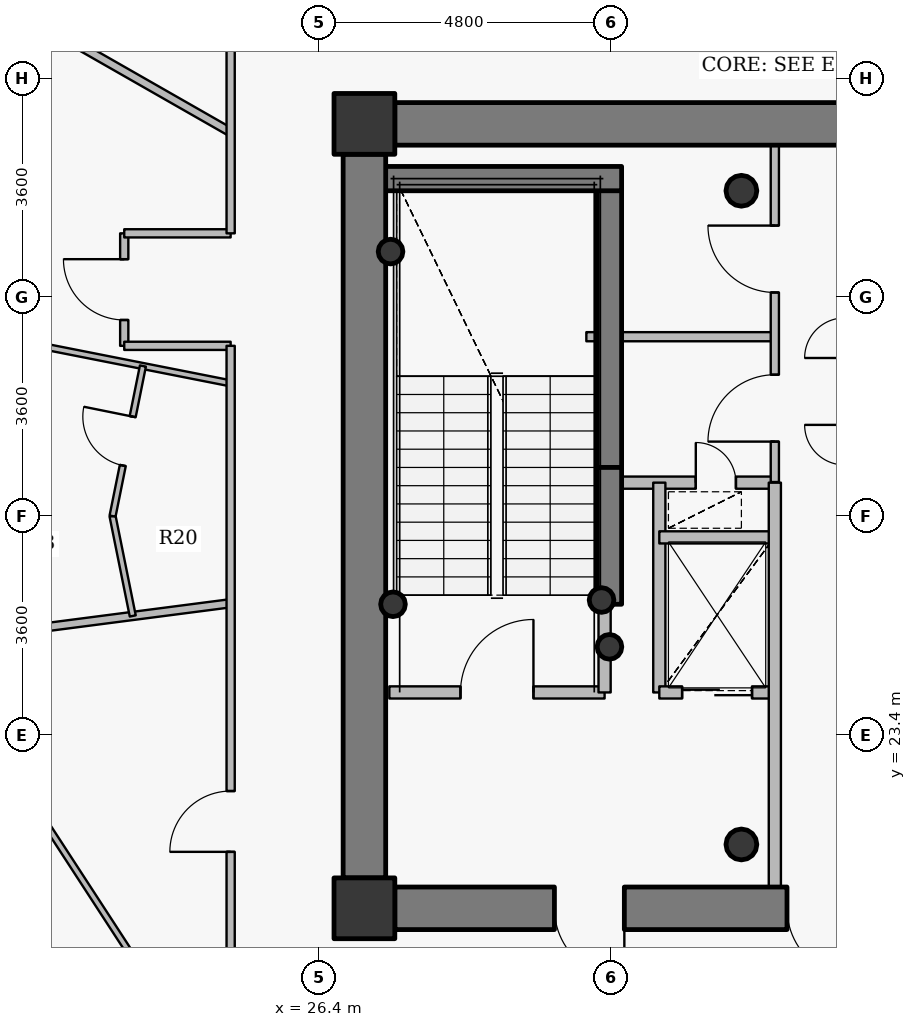
"""IFC4 building model, lengths in metres.
Left out: names, types, materials, properties, quantities, classifications, styles, units other than length and angle.
Written with IfcOpenShell. Run it as: python <this file> out.ifc"""

import sys

from ifc_helpers import new_model, si_unit, direction, frame, frame_2d, origin, origin_2d, place, context, subcontext, project, spatial, rectangle, hollow_circle, extrude, source, transform, mapped, element, fill, save


model = new_model("IFC4")
c1 = context("Model", 3, precision=1e-05, world=origin(), true_north=direction((0.0, 1.0)))
c2 = subcontext(c1, "Body", "Model", "MODEL_VIEW")
j1 = project(units=[si_unit("LENGTHUNIT", "METRE"), si_unit("PLANEANGLEUNIT", "RADIAN")], contexts=[c1])
p1 = place(None, origin())
s1 = spatial("IfcSite", under=j1, at=p1, CompositionType="ELEMENT")
p2 = place(p1, origin())
s2 = spatial("IfcBuilding", under=s1, at=p2, CompositionType="ELEMENT")
p3 = place(p2, frame((0.0, 0.0, 299.25)))
s3 = spatial("IfcBuildingStorey", under=s2, at=p3, CompositionType="ELEMENT", Elevation=299.25)
for number, where, z_axis, x_axis in (
    (1, (27.15, 20.55, 0.0), (0.0, 0.0, 1.0), (1.0, 0.0, 0.0)),
    (2, (27.15, 33.45, 0.0), (0.0, 0.0, 1.0), (1.0, 0.0, 0.0)),
):
    element("IfcColumn", number, at=place(p3, frame(where, z_axis=z_axis, x_axis=x_axis)), inside=s3, PredefinedType="COLUMN", context=c2, shape_type="SweptSolid", body=[
        extrude(rectangle(XDim=1.0, YDim=1.0, at=origin_2d()), origin(), (0.0, 0.0, 1.0), 3.75),
    ])
for number, where, z_axis, x_axis in (
    (3, (33.35, 21.6, 0.0), (0.0, 0.0, 1.0), (1.0, 0.0, 0.0)),
    (4, (33.35, 32.35, 0.0), (0.0, 0.0, 1.0), (1.0, 0.0, 0.0)),
):
    element("IfcColumn", number, at=place(p3, frame(where, z_axis=z_axis, x_axis=x_axis)), inside=s3, PredefinedType="COLUMN", context=c2, shape_type="SweptSolid", body=[
        extrude(hollow_circle(Radius=0.254, WallThickness=0.02, at=origin_2d()), origin(), (0.0, 0.0, 1.0), 3.75),
    ])
p4 = place(p3, frame((31.18, 27.8, 0.0), z_axis=(0.0, 0.0, 1.0), x_axis=(0.0, 1.0, 0.0)))
e5 = element("IfcWall", 5, at=p4, inside=s3, PredefinedType="SHEAR", context=c2, shape_type="SweptSolid", body=[
    extrude(rectangle(XDim=4.75, YDim=0.4, at=frame_2d((2.375, 0.0))), origin(), (0.0, 0.0, 1.0), 3.75),
])
p5 = place(p3, frame((27.25, 32.55, 0.0), z_axis=(0.0, 0.0, 1.0), x_axis=(1.0, 0.0, 0.0)))
e6 = element("IfcWall", 6, at=p5, inside=s3, PredefinedType="SHEAR", context=c2, shape_type="SweptSolid", body=[
    extrude(rectangle(XDim=4.13, YDim=0.4, at=frame_2d((2.065, 0.0))), origin(), (0.0, 0.0, 1.0), 3.75),
])
for number, where, z_axis, x_axis in (
    (7, (27.58, 31.35, 0.0), (0.0, 0.0, 1.0), (1.0, 0.0, 0.0)),
    (8, (31.05, 25.62, 0.0), (0.0, 0.0, 1.0), (1.0, 0.0, 0.0)),
    (9, (31.18, 24.85, 0.0), (0.0, 0.0, 1.0), (1.0, 0.0, 0.0)),
    (10, (27.62, 25.55, 0.0), (0.0, 0.0, 1.0), (1.0, 0.0, 0.0)),
):
    element("IfcColumn", number, at=place(p3, frame(where, z_axis=z_axis, x_axis=x_axis)), inside=s3, PredefinedType="COLUMN", context=c2, shape_type="SweptSolid", body=[
        extrude(hollow_circle(Radius=0.203, WallThickness=0.016, at=origin_2d()), origin(), (0.0, 0.0, 1.0), 3.75),
    ])
p6 = place(p3, frame((27.65, 33.45, 0.0), z_axis=(0.0, 0.0, 1.0), x_axis=(1.0, 0.0, 0.0)))
e11 = element("IfcWall", 11, at=p6, inside=s3, PredefinedType="SHEAR", context=c2, shape_type="SweptSolid", body=[
    extrude(rectangle(XDim=16.7, YDim=0.7, at=frame_2d((8.35, 0.0))), origin(), (0.0, 0.0, 1.0), 3.05),
])
p7 = place(p6, frame((12.775, 0.0, 0.0)))
e12 = element("IfcOpeningElement", 12, at=p7, cuts=e11, PredefinedType="OPENING", context=c2, shape_type="SweptSolid", body=[
    extrude(rectangle(XDim=1.15, YDim=2.15, at=origin_2d()), frame((0.575, 0.36, 1.075), z_axis=(0.0, -1.0, 0.0), x_axis=(1.0, 0.0, 0.0)), (0.0, 0.0, 1.0), 0.72),
])
p8 = place(p3, frame((44.35, 20.55, 0.0), z_axis=(0.0, 0.0, 1.0), x_axis=(-1.0, 0.0, 0.0)))
e13 = element("IfcWall", 13, at=p8, inside=s3, PredefinedType="SHEAR", context=c2, shape_type="SweptSolid", body=[
    extrude(rectangle(XDim=16.7, YDim=0.7, at=frame_2d((8.35, 0.0))), origin(), (0.0, 0.0, 1.0), 3.05),
])
p9 = place(p8, frame((12.925, 0.0, 0.0)))
e14 = element("IfcOpeningElement", 14, at=p9, cuts=e13, PredefinedType="OPENING", context=c2, shape_type="SweptSolid", body=[
    extrude(rectangle(XDim=1.15, YDim=2.15, at=origin_2d()), frame((0.575, 0.36, 1.075), z_axis=(0.0, -1.0, 0.0), x_axis=(1.0, 0.0, 0.0)), (0.0, 0.0, 1.0), 0.72),
])
p10 = place(p8, frame((9.1, 0.0, 0.0)))
e15 = element("IfcOpeningElement", 15, at=p10, cuts=e13, PredefinedType="OPENING", context=c2, shape_type="SweptSolid", body=[
    extrude(rectangle(XDim=1.15, YDim=2.15, at=origin_2d()), frame((0.575, 0.36, 1.075), z_axis=(0.0, -1.0, 0.0), x_axis=(1.0, 0.0, 0.0)), (0.0, 0.0, 1.0), 0.72),
])
p11 = place(p3, frame((27.15, 21.05, 0.0), z_axis=(0.0, 0.0, 1.0), x_axis=(0.0, 1.0, 0.0)))
e16 = element("IfcWall", 16, at=p11, inside=s3, PredefinedType="SHEAR", context=c2, shape_type="SweptSolid", body=[
    extrude(rectangle(XDim=11.9, YDim=0.7, at=frame_2d((5.95, 0.0))), origin(), (0.0, 0.0, 1.0), 3.05),
])
p12 = place(p3, frame((31.18, 25.55, 0.0), z_axis=(0.0, 0.0, 1.0), x_axis=(0.0, 1.0, 0.0)))
e17 = element("IfcWall", 17, at=p12, inside=s3, PredefinedType="SHEAR", context=c2, shape_type="SweptSolid", body=[
    extrude(rectangle(XDim=2.25, YDim=0.4, at=frame_2d((1.125, 0.0))), origin(), (0.0, 0.0, 1.0), 3.1),
])
p13 = place(p3, frame((14.033, 24.151, 0.0), z_axis=(0.0, 0.0, 1.0), x_axis=(0.99169266035, 0.128629963101, 0.0)))
e18 = element("IfcWall", 18, at=p13, inside=s3, PredefinedType="PARTITIONING", context=c2, shape_type="SweptSolid", body=[
    extrude(rectangle(XDim=11.009, YDim=0.135, at=frame_2d((5.504, 0.0))), origin(), (0.0, 0.0, 1.0), 2.985),
])
p14 = place(p3, frame((18.016, 37.274, 0.0), z_axis=(0.0, 0.0, 1.0), x_axis=(0.868277005727, -0.496079672357, 0.0)))
e19 = element("IfcWall", 19, at=p14, inside=s3, PredefinedType="PARTITIONING", context=c2, shape_type="SweptSolid", body=[
    extrude(rectangle(XDim=7.985, YDim=0.135, at=frame_2d((3.993, 0.0))), origin(), (0.0, 0.0, 1.0), 2.985),
])
p15 = place(p3, frame((20.922, 29.979, 0.0), z_axis=(0.0, 0.0, 1.0), x_axis=(0.981042206934, -0.19379419035, 0.0)))
e20 = element("IfcWall", 20, at=p15, inside=s3, PredefinedType="PARTITIONING", context=c2, shape_type="SweptSolid", body=[
    extrude(rectangle(XDim=4.106, YDim=0.1, at=frame_2d((2.053, 0.0))), origin(), (0.0, 0.0, 1.0), 3.5),
])
p16 = place(p3, frame((21.087, 23.206, 0.0), z_axis=(0.0, 0.0, 1.0), x_axis=(0.545435886628, -0.838152547916, 0.0)))
e21 = element("IfcWall", 21, at=p16, inside=s3, PredefinedType="PARTITIONING", context=c2, shape_type="SweptSolid", body=[
    extrude(rectangle(XDim=4.083, YDim=0.1, at=frame_2d((2.042, 0.0))), origin(), (0.0, 0.0, 1.0), 3.035),
])
p17 = place(p3, frame((23.008, 27.0, 0.0), z_axis=(0.0, 0.0, 1.0), x_axis=(0.198189512146, -0.980163719628, 0.0)))
e22 = element("IfcWall", 22, at=p17, inside=s3, PredefinedType="PARTITIONING", context=c2, shape_type="SweptSolid", body=[
    extrude(rectangle(XDim=1.675, YDim=0.1, at=frame_2d((0.838, 0.0))), origin(), (0.0, 0.0, 1.0), 3.035),
])
p18 = place(p3, frame((23.008, 27.0, 0.0), z_axis=(0.0, 0.0, 1.0), x_axis=(0.19818541272, 0.980164548525, 0.0)))
e23 = element("IfcWall", 23, at=p18, inside=s3, PredefinedType="PARTITIONING", context=c2, shape_type="SweptSolid", body=[
    extrude(rectangle(XDim=2.518, YDim=0.1, at=frame_2d((1.259, 0.0))), origin(), (0.0, 0.0, 1.0), 3.035),
])
p19 = place(p18, frame((0.849, 0.0, 0.0)))
e24 = element("IfcOpeningElement", 24, at=p19, cuts=e23, PredefinedType="OPENING", context=c2, shape_type="SweptSolid", body=[
    extrude(rectangle(XDim=0.82, YDim=2.1, at=origin_2d()), frame((0.41, 0.06, 1.05), z_axis=(0.0, -1.0, 0.0), x_axis=(1.0, 0.0, 0.0)), (0.0, 0.0, 1.0), 0.12),
])
p20 = place(p3, frame((23.2, 29.8, 0.0), z_axis=(0.0, 0.0, 1.0), x_axis=(0.0, 1.0, 0.0)))
e25 = element("IfcWall", 25, at=p20, inside=s3, PredefinedType="PARTITIONING", context=c2, shape_type="SweptSolid", body=[
    extrude(rectangle(XDim=1.85, YDim=0.135, at=frame_2d((0.925, 0.0))), origin(), (0.0, 0.0, 1.0), 3.185),
])
p21 = place(p20, frame((0.425, 0.0, 0.0)))
e26 = element("IfcOpeningElement", 26, at=p21, cuts=e25, PredefinedType="OPENING", context=c2, shape_type="SweptSolid", body=[
    extrude(rectangle(XDim=1.0, YDim=2.15, at=origin_2d()), frame((0.5, 0.078, 1.075), z_axis=(0.0, -1.0, 0.0), x_axis=(1.0, 0.0, 0.0)), (0.0, 0.0, 1.0), 0.155),
])
p22 = place(p3, frame((23.2, 29.8, 0.0), z_axis=(0.0, 0.0, 1.0), x_axis=(1.0, 0.0, 0.0)))
e27 = element("IfcWall", 27, at=p22, inside=s3, PredefinedType="PARTITIONING", context=c2, shape_type="SweptSolid", body=[
    extrude(rectangle(XDim=1.75, YDim=0.135, at=frame_2d((0.875, 0.0))), origin(), (0.0, 0.0, 1.0), 3.5),
])
p23 = place(p3, frame((23.2, 31.65, 0.0), z_axis=(0.0, 0.0, 1.0), x_axis=(1.0, 0.0, 0.0)))
e28 = element("IfcWall", 28, at=p23, inside=s3, PredefinedType="PARTITIONING", context=c2, shape_type="SweptSolid", body=[
    extrude(rectangle(XDim=1.75, YDim=0.135, at=frame_2d((0.875, 0.0))), origin(), (0.0, 0.0, 1.0), 3.035),
])
p24 = place(p3, frame((24.95, 18.35, 0.0), z_axis=(0.0, 0.0, 1.0), x_axis=(0.0, 1.0, 0.0)))
e29 = element("IfcWall", 29, at=p24, inside=s3, PredefinedType="PARTITIONING", context=c2, shape_type="SweptSolid", body=[
    extrude(rectangle(XDim=11.45, YDim=0.135, at=frame_2d((5.725, 0.0))), origin(), (0.0, 0.0, 1.0), 3.035),
])
p25 = place(p24, frame((3.128, 0.0, 0.0)))
e30 = element("IfcOpeningElement", 30, at=p25, cuts=e29, PredefinedType="OPENING", context=c2, shape_type="SweptSolid", body=[
    extrude(rectangle(XDim=1.0, YDim=2.15, at=origin_2d()), frame((0.5, 0.078, 1.075), z_axis=(0.0, -1.0, 0.0), x_axis=(1.0, 0.0, 0.0)), (0.0, 0.0, 1.0), 0.155),
])
p26 = place(p3, frame((24.95, 31.65, 0.0), z_axis=(0.0, 0.0, 1.0), x_axis=(0.0, 1.0, 0.0)))
e31 = element("IfcWall", 31, at=p26, inside=s3, PredefinedType="PARTITIONING", context=c2, shape_type="SweptSolid", body=[
    extrude(rectangle(XDim=4.0, YDim=0.135, at=frame_2d((2.0, 0.0))), origin(), (0.0, 0.0, 1.0), 3.035),
])
p27 = place(p3, frame((27.56, 24.1, 0.0), z_axis=(0.0, 0.0, 1.0), x_axis=(1.0, 0.0, 0.0)))
e32 = element("IfcWall", 32, at=p27, inside=s3, PredefinedType="PARTITIONING", context=c2, shape_type="SweptSolid", body=[
    extrude(rectangle(XDim=3.54, YDim=0.2, at=frame_2d((1.77, 0.0))), origin(), (0.0, 0.0, 1.0), 3.5),
])
p28 = place(p27, frame((1.17, 0.0, 0.0)))
e33 = element("IfcOpeningElement", 33, at=p28, cuts=e32, PredefinedType="OPENING", context=c2, shape_type="SweptSolid", body=[
    extrude(rectangle(XDim=1.2, YDim=2.15, at=origin_2d()), frame((0.6, 0.11, 1.075), z_axis=(0.0, -1.0, 0.0), x_axis=(1.0, 0.0, 0.0)), (0.0, 0.0, 1.0), 0.22),
])
p29 = place(p3, frame((30.8, 29.95, 0.0), z_axis=(0.0, 0.0, 1.0), x_axis=(1.0, 0.0, 0.0)))
e34 = element("IfcWall", 34, at=p29, inside=s3, PredefinedType="PARTITIONING", context=c2, shape_type="SweptSolid", body=[
    extrude(rectangle(XDim=3.1, YDim=0.15, at=frame_2d((1.55, 0.0))), origin(), (0.0, 0.0, 1.0), 3.085),
])
p30 = place(p3, frame((31.1, 24.1, 0.0), z_axis=(0.0, 0.0, 1.0), x_axis=(0.0, 1.0, 0.0)))
e35 = element("IfcWall", 35, at=p30, inside=s3, PredefinedType="PARTITIONING", context=c2, shape_type="SweptSolid", body=[
    extrude(rectangle(XDim=1.44, YDim=0.2, at=frame_2d((0.72, 0.0))), origin(), (0.0, 0.0, 1.0), 3.5),
])
p31 = place(p3, frame((31.1, 27.55, 0.0), z_axis=(0.0, 0.0, 1.0), x_axis=(1.0, 0.0, 0.0)))
e36 = element("IfcWall", 36, at=p31, inside=s3, PredefinedType="PARTITIONING", context=c2, shape_type="SweptSolid", body=[
    extrude(rectangle(XDim=2.8, YDim=0.2, at=frame_2d((1.4, 0.0))), origin(), (0.0, 0.0, 1.0), 3.085),
])
p32 = place(p31, frame((1.5, 0.0, 0.0)))
e37 = element("IfcOpeningElement", 37, at=p32, cuts=e36, PredefinedType="OPENING", context=c2, shape_type="SweptSolid", body=[
    extrude(rectangle(XDim=0.66, YDim=2.05, at=origin_2d()), frame((0.33, 0.11, 1.025), z_axis=(0.0, -1.0, 0.0), x_axis=(1.0, 0.0, 0.0)), (0.0, 0.0, 1.0), 0.22),
])
p33 = place(p3, frame((32.0, 24.1, 0.0), z_axis=(0.0, 0.0, 1.0), x_axis=(0.0, 1.0, 0.0)))
e38 = element("IfcWall", 38, at=p33, inside=s3, PredefinedType="PARTITIONING", context=c2, shape_type="SweptSolid", body=[
    extrude(rectangle(XDim=3.45, YDim=0.2, at=frame_2d((1.725, 0.0))), origin(), (0.0, 0.0, 1.0), 3.5),
])
p34 = place(p3, frame((32.0, 24.1, 0.0), z_axis=(0.0, 0.0, 1.0), x_axis=(1.0, 0.0, 0.0)))
e39 = element("IfcWall", 39, at=p34, inside=s3, PredefinedType="PARTITIONING", context=c2, shape_type="SweptSolid", body=[
    extrude(rectangle(XDim=1.9, YDim=0.2, at=frame_2d((0.95, 0.0))), origin(), (0.0, 0.0, 1.0), 3.085),
])
p35 = place(p34, frame((0.375, 0.0, 0.0)))
e40 = element("IfcOpeningElement", 40, at=p35, cuts=e39, PredefinedType="OPENING", context=c2, shape_type="SweptSolid", body=[
    extrude(rectangle(XDim=1.15, YDim=2.15, at=origin_2d()), frame((0.575, 0.11, 1.075), z_axis=(0.0, -1.0, 0.0), x_axis=(1.0, 0.0, 0.0)), (0.0, 0.0, 1.0), 0.22),
])
p36 = place(p3, frame((32.0, 26.65, 0.0), z_axis=(0.0, 0.0, 1.0), x_axis=(1.0, 0.0, 0.0)))
e41 = element("IfcWall", 41, at=p36, inside=s3, PredefinedType="PARTITIONING", context=c2, shape_type="SweptSolid", body=[
    extrude(rectangle(XDim=1.9, YDim=0.2, at=frame_2d((0.95, 0.0))), origin(), (0.0, 0.0, 1.0), 3.085),
])
p37 = place(p3, frame((33.9, 20.9, 0.0), z_axis=(0.0, 0.0, 1.0), x_axis=(0.0, 1.0, 0.0)))
e42 = element("IfcWall", 42, at=p37, inside=s3, PredefinedType="PARTITIONING", context=c2, shape_type="SweptSolid", body=[
    extrude(rectangle(XDim=6.65, YDim=0.2, at=frame_2d((3.325, 0.0))), origin(), (0.0, 0.0, 1.0), 3.085),
])
p38 = place(p3, frame((33.9, 27.56, 0.0), z_axis=(0.0, 0.0, 1.0), x_axis=(0.0, 1.0, 0.0)))
e43 = element("IfcWall", 43, at=p38, inside=s3, PredefinedType="PARTITIONING", context=c2, shape_type="SweptSolid", body=[
    extrude(rectangle(XDim=5.54, YDim=0.135, at=frame_2d((2.77, 0.0))), origin(), (0.0, 0.0, 1.0), 3.085),
])
p39 = place(p38, frame((0.665, 0.0, 0.0)))
e44 = element("IfcOpeningElement", 44, at=p39, cuts=e43, PredefinedType="OPENING", context=c2, shape_type="SweptSolid", body=[
    extrude(rectangle(XDim=1.1, YDim=2.15, at=origin_2d()), frame((0.55, 0.078, 1.075), z_axis=(0.0, -1.0, 0.0), x_axis=(1.0, 0.0, 0.0)), (0.0, 0.0, 1.0), 0.155),
])
p40 = place(p38, frame((3.117, 0.0, 0.0)))
e45 = element("IfcOpeningElement", 45, at=p40, cuts=e43, PredefinedType="OPENING", context=c2, shape_type="SweptSolid", body=[
    extrude(rectangle(XDim=1.1, YDim=2.15, at=origin_2d()), frame((0.55, 0.078, 1.075), z_axis=(0.0, -1.0, 0.0), x_axis=(1.0, 0.0, 0.0)), (0.0, 0.0, 1.0), 0.155),
])
p41 = place(p3, frame((27.64, 33.8, 0.0), z_axis=(0.0, 0.0, 1.0), x_axis=(-1.0, 0.0, 0.0)))
e46 = element("IfcWall", 46, at=p41, inside=s3, PredefinedType="PARTITIONING", context=c2, shape_type="SweptSolid", body=[
    extrude(rectangle(XDim=0.84, YDim=0.135, at=frame_2d((0.42, 0.0))), origin(), (0.0, 0.0, 1.0), 3.035),
])
p42 = place(p3, frame((26.8, 33.492, 0.0), z_axis=(0.0, 0.0, 1.0), x_axis=(0.0, -1.0, 0.0)))
e47 = element("IfcWall", 47, at=p42, inside=s3, PredefinedType="PARTITIONING", context=c2, shape_type="SweptSolid", body=[
    extrude(rectangle(XDim=0.532, YDim=0.135, at=frame_2d((0.266, 0.0))), origin(), (0.0, 0.0, 1.0), 3.5),
])
p43 = place(p3, frame((26.8, 21.04, 0.0), z_axis=(0.0, 0.0, 1.0), x_axis=(0.0, -1.0, 0.0)))
e48 = element("IfcWall", 48, at=p43, inside=s3, PredefinedType="PARTITIONING", context=c2, shape_type="SweptSolid", body=[
    extrude(rectangle(XDim=0.84, YDim=0.135, at=frame_2d((0.42, 0.0))), origin(), (0.0, 0.0, 1.0), 3.035),
])
p44 = place(p3, frame((27.107, 20.2, 0.0), z_axis=(0.0, 0.0, 1.0), x_axis=(1.0, 0.0, 0.0)))
e49 = element("IfcWall", 49, at=p44, inside=s3, PredefinedType="PARTITIONING", context=c2, shape_type="SweptSolid", body=[
    extrude(rectangle(XDim=0.532, YDim=0.135, at=frame_2d((0.266, 0.0))), origin(), (0.0, 0.0, 1.0), 3.035),
])
m1 = source(origin(), c2, "Body", "SweptSolid", [
    extrude(rectangle(XDim=1.15, YDim=2.15, at=origin_2d()), frame((0.575, 0.025, 1.075), z_axis=(0.0, -1.0, 0.0), x_axis=(1.0, 0.0, 0.0)), (0.0, 0.0, 1.0), 0.05),
])
p45 = place(p9, origin())
e50 = element("IfcDoor", 50, at=p45, inside=s3, OperationType="SINGLE_SWING_LEFT", PredefinedType="DOOR", context=c2, shape_type="MappedRepresentation", body=[
    mapped(m1, transform((0.0, 0.0, 0.0), x_axis=(1.0, 0.0, 0.0), y_axis=(0.0, 1.0, 0.0), z_axis=(0.0, 0.0, 1.0), scale=1.0)),
])
fill(e14, e50)
p46 = place(p10, origin())
e51 = element("IfcDoor", 51, at=p46, inside=s3, OperationType="SINGLE_SWING_LEFT", PredefinedType="DOOR", context=c2, shape_type="MappedRepresentation", body=[
    mapped(m1, transform((0.0, 0.0, 0.0), x_axis=(1.0, 0.0, 0.0), y_axis=(0.0, 1.0, 0.0), z_axis=(0.0, 0.0, 1.0), scale=1.0)),
])
fill(e15, e51)
m2 = source(origin(), c2, "Body", "SweptSolid", [
    extrude(rectangle(XDim=1.2, YDim=2.15, at=origin_2d()), frame((0.6, 0.025, 1.075), z_axis=(0.0, -1.0, 0.0), x_axis=(1.0, 0.0, 0.0)), (0.0, 0.0, 1.0), 0.05),
])
p47 = place(p28, origin())
e52 = element("IfcDoor", 52, at=p47, inside=s3, OperationType="SINGLE_SWING_RIGHT", PredefinedType="DOOR", context=c2, shape_type="MappedRepresentation", body=[
    mapped(m2, transform((0.0, 0.0, 0.0), x_axis=(1.0, 0.0, 0.0), y_axis=(0.0, 1.0, 0.0), z_axis=(0.0, 0.0, 1.0), scale=1.0)),
])
fill(e33, e52)
m3 = source(origin(), c2, "Body", "SweptSolid", [
    extrude(rectangle(XDim=1.15, YDim=2.15, at=origin_2d()), frame((0.575, 0.025, 1.075), z_axis=(0.0, -1.0, 0.0), x_axis=(1.0, 0.0, 0.0)), (0.0, 0.0, 1.0), 0.05),
])
p48 = place(p35, origin())
e53 = element("IfcDoor", 53, at=p48, inside=s3, OperationType="DOUBLE_DOOR_SLIDING", PredefinedType="USERDEFINED", context=c2, shape_type="MappedRepresentation", body=[
    mapped(m3, transform((0.0, 0.0, 0.0), x_axis=(1.0, 0.0, 0.0), y_axis=(0.0, 1.0, 0.0), z_axis=(0.0, 0.0, 1.0), scale=1.0)),
])
fill(e40, e53)
m4 = source(origin(), c2, "Body", "SweptSolid", [
    extrude(rectangle(XDim=1.0, YDim=2.15, at=origin_2d()), frame((0.5, 0.025, 1.075), z_axis=(0.0, -1.0, 0.0), x_axis=(1.0, 0.0, 0.0)), (0.0, 0.0, 1.0), 0.05),
])
p49 = place(p21, origin())
e54 = element("IfcDoor", 54, at=p49, inside=s3, OperationType="SINGLE_SWING_RIGHT", PredefinedType="DOOR", context=c2, shape_type="MappedRepresentation", body=[
    mapped(m4, transform((0.0, 0.0, 0.0), x_axis=(1.0, 0.0, 0.0), y_axis=(0.0, 1.0, 0.0), z_axis=(0.0, 0.0, 1.0), scale=1.0)),
])
fill(e26, e54)
m5 = source(origin(), c2, "Body", "SweptSolid", [
    extrude(rectangle(XDim=0.82, YDim=2.1, at=origin_2d()), frame((0.41, 0.025, 1.05), z_axis=(0.0, -1.0, 0.0), x_axis=(1.0, 0.0, 0.0)), (0.0, 0.0, 1.0), 0.05),
])
p50 = place(p19, origin())
e55 = element("IfcDoor", 55, at=p50, inside=s3, OperationType="SINGLE_SWING_RIGHT", PredefinedType="DOOR", context=c2, shape_type="MappedRepresentation", body=[
    mapped(m5, transform((0.0, 0.0, 0.0), x_axis=(1.0, 0.0, 0.0), y_axis=(0.0, 1.0, 0.0), z_axis=(0.0, 0.0, 1.0), scale=1.0)),
])
fill(e24, e55)
p51 = place(p25, origin())
e56 = element("IfcDoor", 56, at=p51, inside=s3, OperationType="SINGLE_SWING_LEFT", PredefinedType="DOOR", context=c2, shape_type="MappedRepresentation", body=[
    mapped(m4, transform((0.0, 0.0, 0.0), x_axis=(1.0, 0.0, 0.0), y_axis=(0.0, 1.0, 0.0), z_axis=(0.0, 0.0, 1.0), scale=1.0)),
])
fill(e30, e56)
m6 = source(origin(), c2, "Body", "SweptSolid", [
    extrude(rectangle(XDim=1.1, YDim=2.15, at=origin_2d()), frame((0.55, 0.025, 1.075), z_axis=(0.0, -1.0, 0.0), x_axis=(1.0, 0.0, 0.0)), (0.0, 0.0, 1.0), 0.05),
])
p52 = place(p39, origin())
e57 = element("IfcDoor", 57, at=p52, inside=s3, OperationType="SINGLE_SWING_LEFT", PredefinedType="DOOR", context=c2, shape_type="MappedRepresentation", body=[
    mapped(m6, transform((0.0, 0.0, 0.0), x_axis=(1.0, 0.0, 0.0), y_axis=(0.0, 1.0, 0.0), z_axis=(0.0, 0.0, 1.0), scale=1.0)),
])
fill(e44, e57)
p53 = place(p40, origin())
e58 = element("IfcDoor", 58, at=p53, inside=s3, OperationType="SINGLE_SWING_RIGHT", PredefinedType="DOOR", context=c2, shape_type="MappedRepresentation", body=[
    mapped(m6, transform((0.0, 0.0, 0.0), x_axis=(1.0, 0.0, 0.0), y_axis=(0.0, 1.0, 0.0), z_axis=(0.0, 0.0, 1.0), scale=1.0)),
])
fill(e45, e58)
m7 = source(origin(), c2, "Body", "SweptSolid", [
    extrude(rectangle(XDim=0.66, YDim=2.05, at=origin_2d()), frame((0.33, 0.025, 1.025), z_axis=(0.0, -1.0, 0.0), x_axis=(1.0, 0.0, 0.0)), (0.0, 0.0, 1.0), 0.05),
])
p54 = place(p32, origin())
e59 = element("IfcDoor", 59, at=p54, inside=s3, OperationType="SINGLE_SWING_LEFT", PredefinedType="USERDEFINED", context=c2, shape_type="MappedRepresentation", body=[
    mapped(m7, transform((0.0, 0.0, 0.0), x_axis=(1.0, 0.0, 0.0), y_axis=(0.0, 1.0, 0.0), z_axis=(0.0, 0.0, 1.0), scale=1.0)),
])
fill(e37, e59)
save(model, sys.argv[1])
